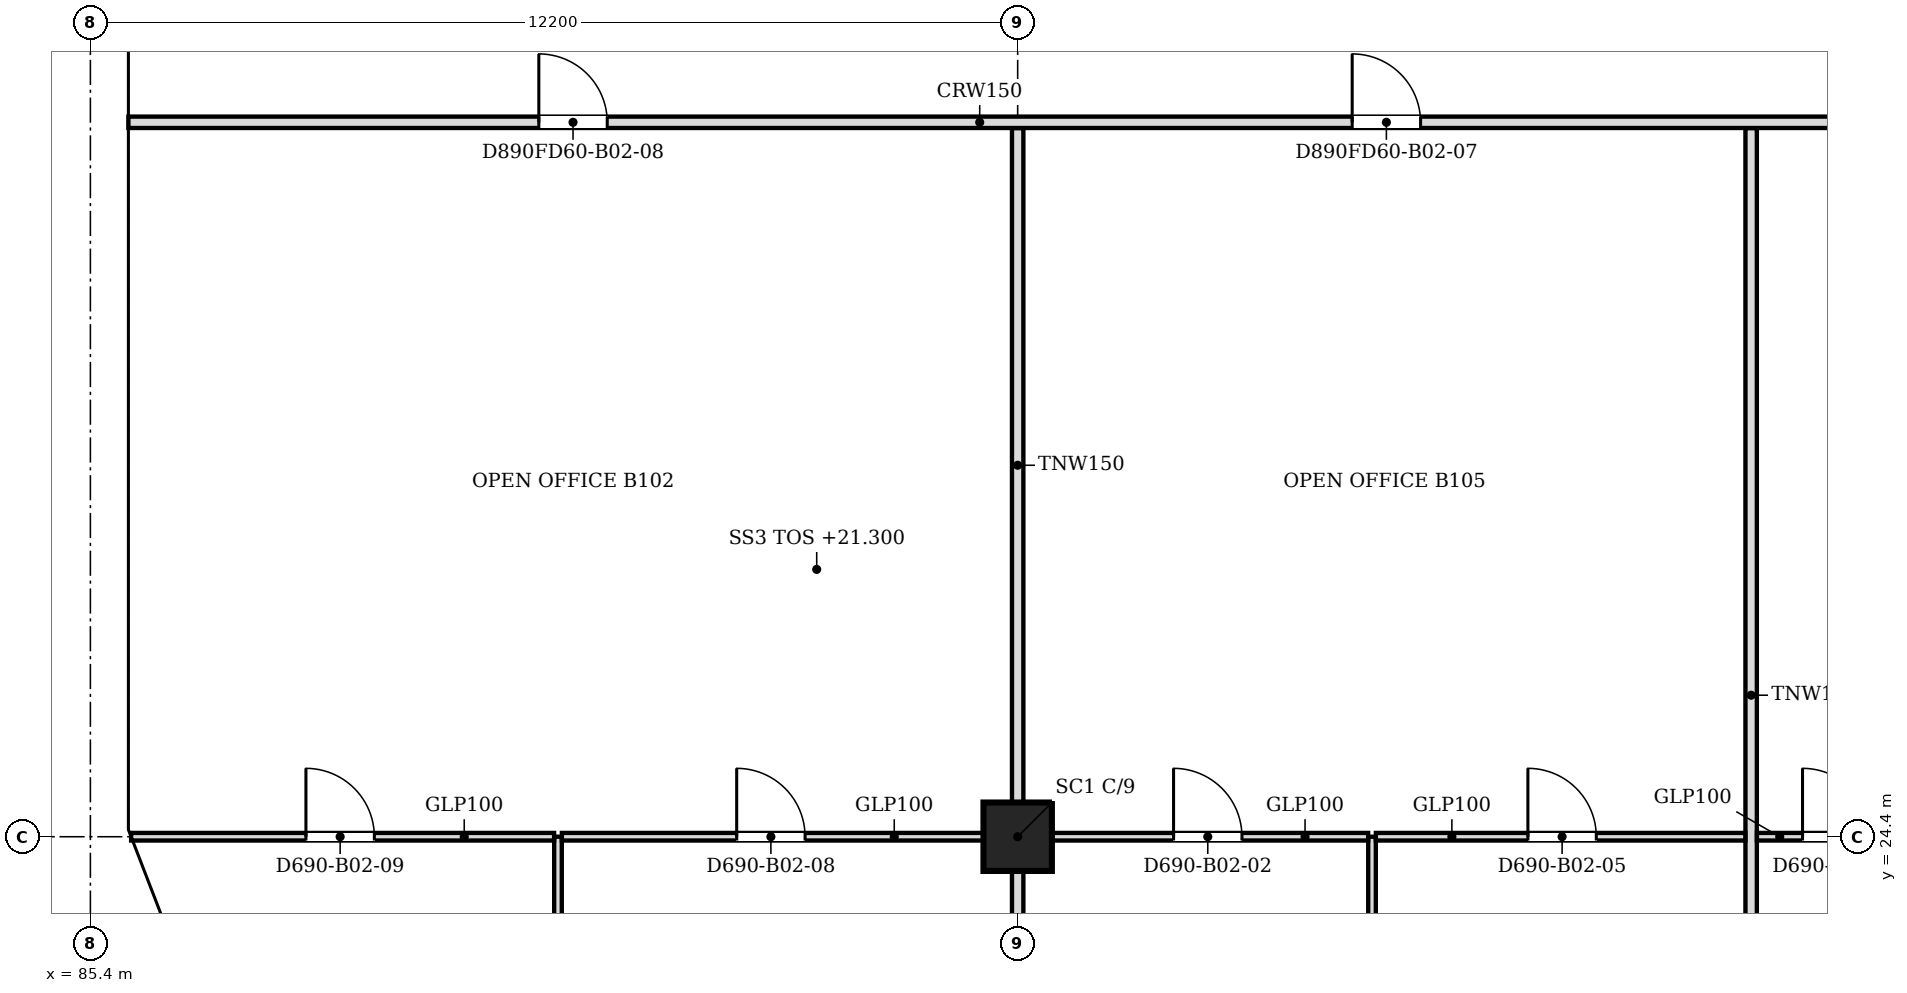
"""IFC4 building model, lengths in metres.
Left out: names, types, materials, properties, quantities, classifications, styles, units other than length and angle.
Written with IfcOpenShell. Run it as: python <this file> out.ifc"""

import sys

from ifc_helpers import new_model, si_unit, direction, frame, frame_2d, origin, origin_2d, place, context, subcontext, project, spatial, polyline, rectangle, outline, extrude, faceted_brep, source, transform, mapped, element, fill, save


model = new_model("IFC4")
c1 = context("Model", 3, precision=1e-05, world=origin(), true_north=direction((0.0, 1.0)))
c2 = subcontext(c1, "Body", "Model", "MODEL_VIEW")
j1 = project(units=[si_unit("LENGTHUNIT", "METRE"), si_unit("PLANEANGLEUNIT", "RADIAN")], contexts=[c1])
p1 = place(None, origin())
s1 = spatial("IfcSite", under=j1, at=p1, CompositionType="ELEMENT")
p2 = place(p1, origin())
s2 = spatial("IfcBuilding", under=s1, at=p2, CompositionType="ELEMENT")
p3 = place(p2, frame((0.0, 0.0, 21.3)))
s3 = spatial("IfcBuildingStorey", under=s2, at=p3, CompositionType="ELEMENT", Elevation=21.3)
p4 = place(p3, frame((97.6, 24.4, 0.0), z_axis=(0.0, 0.0, 1.0), x_axis=(1.0, 0.0, 0.0)))
e1 = element("IfcColumn", 1, at=p4, inside=s3, PredefinedType="COLUMN", context=c2, shape_type="SweptSolid", body=[
    extrude(rectangle(XDim=0.9, YDim=0.9, at=origin_2d()), origin(), (0.0, 0.0, 1.0), 4.3),
])
m1 = source(origin(), c2, "Body", "Brep", [
    faceted_brep([(3.05, -0.25, 0.0), (6.1, -0.25, 4.5), (6.1, -0.25, 4.5), (3.05, -0.25, 9.0), (0.0, -0.25, 4.5), (0.0, 0.25, 4.5), (3.05, 0.25, 9.0), (6.1, 0.25, 4.5), (6.1, 0.25, 4.5), (3.05, 0.25, 0.0)], [[[0, 1, 2, 3, 4]], [[5, 6, 7, 8, 9]], [[9, 8, 1, 0]], [[7, 6, 3, 2]], [[6, 5, 4, 3]], [[5, 9, 0, 4]], [[1, 8, 7, 2]]]),
])
p5 = place(p3, frame((85.65, 39.65, -4.5), z_axis=(0.0, 0.0, 1.0), x_axis=(0.0, -1.0, 0.0)))
e2 = element("IfcWall", 2, at=p5, inside=s3, PredefinedType="SOLIDWALL", context=c2, shape_type="MappedRepresentation", body=[
    mapped(m1, transform((0.0, 0.0, 0.0), scale=1.0)),
])
m2 = source(origin(), c2, "Body", "SweptSolid", [
    extrude(outline(polyline([(3.05, 0.446), (5.798, 4.5), (3.05, 8.554), (0.302, 4.5), (3.05, 0.446)])), frame((0.0, 0.26, 0.0), z_axis=(0.0, -1.0, 0.0), x_axis=(1.0, 0.0, 0.0)), (0.0, 0.0, 1.0), 0.52),
])
p6 = place(p5, origin())
e3 = element("IfcOpeningElement", 3, at=p6, cuts=e2, PredefinedType="OPENING", context=c2, shape_type="MappedRepresentation", body=[
    mapped(m2, transform((0.0, 0.0, 0.0), scale=1.0)),
])
m3 = source(origin(), c2, "Body", "SweptSolid", [
    extrude(outline(polyline([(3.05, 0.0), (4.85, 2.656), (4.85, 6.344), (3.05, 9.0), (0.0, 4.5), (3.05, 0.0)])), frame((0.0, 0.25, 0.0), z_axis=(0.0, -1.0, 0.0), x_axis=(1.0, 0.0, 0.0)), (0.0, 0.0, 1.0), 0.5),
])
p7 = place(p3, frame((85.65, 33.55, -4.5), z_axis=(0.0, 0.0, 1.0), x_axis=(0.0, -1.0, 0.0)))
e4 = element("IfcWall", 4, at=p7, inside=s3, PredefinedType="SOLIDWALL", context=c2, shape_type="MappedRepresentation", body=[
    mapped(m3, transform((0.0, 0.0, 0.0), scale=1.0)),
])
m4 = source(origin(), c2, "Body", "SweptSolid", [
    extrude(outline(polyline([(3.05, 0.446), (4.85, 3.101), (4.85, 5.899), (3.05, 8.554), (0.302, 4.5), (3.05, 0.446)])), frame((0.0, 0.26, 0.0), z_axis=(0.0, -1.0, 0.0), x_axis=(1.0, 0.0, 0.0)), (0.0, 0.0, 1.0), 0.52),
])
p8 = place(p7, origin())
e5 = element("IfcOpeningElement", 5, at=p8, cuts=e4, PredefinedType="OPENING", context=c2, shape_type="MappedRepresentation", body=[
    mapped(m4, transform((0.0, 0.0, 0.0), scale=1.0)),
])
m5 = source(origin(), c2, "Body", "Brep", [
    faceted_brep([(1.753, -0.25, 0.0), (1.8, -0.25, 0.071), (1.8, -0.25, 8.929), (1.753, -0.25, 9.0), (0.0, -0.25, 6.373), (0.0, -0.25, 2.627), (0.0, 0.25, 2.627), (0.0, 0.25, 6.373), (1.707, 0.25, 8.93), (1.707, 0.25, 0.07), (1.753, 0.0, 0.0), (1.753, 0.0, 9.0)], [[[0, 1, 2, 3, 4, 5]], [[6, 7, 8, 9]], [[1, 0, 10]], [[11, 3, 2]], [[8, 7, 4, 3, 11]], [[7, 6, 5, 4]], [[6, 9, 10, 0, 5]], [[1, 10, 9, 8, 11, 2]]]),
])
p9 = place(p3, frame((85.65, 26.2, -4.5), z_axis=(0.0, 0.0, 1.0), x_axis=(0.0, -1.0, 0.0)))
e6 = element("IfcWall", 6, at=p9, inside=s3, PredefinedType="SOLIDWALL", context=c2, shape_type="MappedRepresentation", body=[
    mapped(m5, transform((0.0, 0.0, 0.0), scale=1.0)),
])
m6 = source(origin(), c2, "Body", "SweptSolid", [
    extrude(outline(polyline([(1.553, 8.25), (0.0, 5.922), (0.0, 3.077), (1.553, 0.75), (1.553, 8.25)])), frame((0.0, 0.26, 0.0), z_axis=(0.0, -1.0, 0.0), x_axis=(1.0, 0.0, 0.0)), (0.0, 0.0, 1.0), 0.52),
])
p10 = place(p9, origin())
e7 = element("IfcOpeningElement", 7, at=p10, cuts=e6, PredefinedType="OPENING", context=c2, shape_type="MappedRepresentation", body=[
    mapped(m6, transform((0.0, 0.0, 0.0), scale=1.0)),
])
m7 = source(origin(), c2, "Body", "Brep", [
    faceted_brep([(0.047, -0.25, 0.0), (2.997, -0.25, 4.5), (0.047, -0.25, 9.0), (0.0, -0.25, 8.93), (0.0, -0.25, 0.07), (0.093, 0.25, 8.929), (2.944, 0.25, 4.581), (2.944, 0.25, 4.419), (0.093, 0.25, 0.071), (2.997, 0.0, 4.5), (0.047, 0.0, 0.0), (0.047, 0.0, 9.0)], [[[0, 1, 2, 3, 4]], [[5, 6, 7, 8]], [[8, 7, 9, 1, 0, 10]], [[6, 5, 11, 2, 1, 9]], [[3, 2, 11]], [[10, 0, 4]], [[8, 10, 4, 3, 11, 5]], [[9, 7, 6]]]),
])
p11 = place(p3, frame((85.633, 24.49, -4.5), z_axis=(0.0, 0.0, 1.0), x_axis=(0.359901446078, -0.932990326376, 0.0)))
e8 = element("IfcWall", 8, at=p11, inside=s3, PredefinedType="SOLIDWALL", context=c2, shape_type="MappedRepresentation", body=[
    mapped(m7, transform((0.0, 0.0, 0.0), scale=1.0)),
])
m8 = source(origin(), c2, "Body", "SweptSolid", [
    extrude(outline(polyline([(0.247, 0.761), (2.698, 4.5), (0.247, 8.239), (0.247, 0.761)])), frame((0.0, 0.26, 0.0), z_axis=(0.0, -1.0, 0.0), x_axis=(1.0, 0.0, 0.0)), (0.0, 0.0, 1.0), 0.52),
])
p12 = place(p11, origin())
e9 = element("IfcOpeningElement", 9, at=p12, cuts=e8, PredefinedType="OPENING", context=c2, shape_type="MappedRepresentation", body=[
    mapped(m8, transform((0.0, 0.0, 0.0), scale=1.0)),
])
m9 = source(origin(), c2, "Body", "SweptSolid", [
    extrude(outline(polyline([(3.05, 0.0), (6.1, 4.5), (0.0, 4.5), (3.05, 0.0)])), frame((0.0, 0.25, 0.0), z_axis=(0.0, -1.0, 0.0), x_axis=(1.0, 0.0, 0.0)), (0.0, 0.0, 1.0), 0.5),
])
p13 = place(p3, frame((85.65, 36.6, 0.0), z_axis=(0.0, 0.0, 1.0), x_axis=(0.0, -1.0, 0.0)))
e10 = element("IfcWall", 10, at=p13, inside=s3, PredefinedType="SOLIDWALL", context=c2, shape_type="MappedRepresentation", body=[
    mapped(m9, transform((0.0, 0.0, 0.0), scale=1.0)),
])
m10 = source(origin(), c2, "Body", "SweptSolid", [
    extrude(outline(polyline([(3.05, 0.446), (5.629, 4.25), (0.471, 4.25), (3.05, 0.446)])), frame((0.0, 0.26, 0.0), z_axis=(0.0, -1.0, 0.0), x_axis=(1.0, 0.0, 0.0)), (0.0, 0.0, 1.0), 0.52),
])
p14 = place(p13, origin())
e11 = element("IfcOpeningElement", 11, at=p14, cuts=e10, PredefinedType="OPENING", context=c2, shape_type="MappedRepresentation", body=[
    mapped(m10, transform((0.0, 0.0, 0.0), scale=1.0)),
])
m11 = source(origin(), c2, "Body", "Brep", [
    faceted_brep([(3.05, -0.25, 0.0), (6.053, -0.25, 4.5), (0.0, -0.25, 4.5), (0.0, 0.25, 4.5), (6.007, 0.25, 4.5), (6.007, 0.25, 4.43), (3.05, 0.25, 0.0), (6.053, 0.0, 4.5)], [[[0, 1, 2]], [[3, 4, 5, 6]], [[6, 5, 7, 1, 0]], [[4, 3, 2, 1, 7]], [[3, 6, 0, 2]], [[5, 4, 7]]]),
])
p15 = place(p3, frame((85.65, 30.5, 0.0), z_axis=(0.0, 0.0, 1.0), x_axis=(0.0, -1.0, 0.0)))
e12 = element("IfcWall", 12, at=p15, inside=s3, PredefinedType="SOLIDWALL", context=c2, shape_type="MappedRepresentation", body=[
    mapped(m11, transform((0.0, 0.0, 0.0), scale=1.0)),
])
m12 = source(origin(), c2, "Body", "SweptSolid", [
    extrude(outline(polyline([(3.048, 0.448), (5.586, 4.25), (0.471, 4.25), (3.048, 0.448)])), frame((0.0, 0.26, 0.0), z_axis=(0.0, -1.0, 0.0), x_axis=(1.0, 0.0, 0.0)), (0.0, 0.0, 1.0), 0.52),
])
p16 = place(p15, origin())
e13 = element("IfcOpeningElement", 13, at=p16, cuts=e12, PredefinedType="OPENING", context=c2, shape_type="MappedRepresentation", body=[
    mapped(m12, transform((0.0, 0.0, 0.0), scale=1.0)),
])
m13 = source(origin(), c2, "Body", "Brep", [
    faceted_brep([(2.95, -0.25, 0.0), (3.003, -0.25, 0.081), (3.003, -0.25, 4.5), (0.0, -0.25, 4.5), (0.047, 0.25, 4.5), (2.898, 0.25, 4.5), (2.898, 0.25, 0.081), (0.047, 0.25, 4.429), (2.95, 0.0, 0.0), (0.0, 0.0, 4.5)], [[[0, 1, 2, 3]], [[4, 5, 6, 7]], [[1, 0, 8]], [[5, 4, 9, 3, 2]], [[7, 6, 8, 0, 3, 9]], [[7, 9, 4]], [[1, 8, 6, 5, 2]]]),
])
p17 = place(p3, frame((85.65, 24.447, 0.0), z_axis=(0.0, 0.0, 1.0), x_axis=(0.35992665181, -0.932980602862, 0.0)))
e14 = element("IfcWall", 14, at=p17, inside=s3, PredefinedType="SOLIDWALL", context=c2, shape_type="MappedRepresentation", body=[
    mapped(m13, transform((0.0, 0.0, 0.0), scale=1.0)),
])
m14 = source(origin(), c2, "Body", "SweptSolid", [
    extrude(outline(polyline([(2.75, 4.25), (0.463, 4.25), (2.75, 0.761), (2.75, 4.25)])), frame((0.0, 0.26, 0.0), z_axis=(0.0, -1.0, 0.0), x_axis=(1.0, 0.0, 0.0)), (0.0, 0.0, 1.0), 0.52),
])
p18 = place(p17, origin())
e15 = element("IfcOpeningElement", 15, at=p18, cuts=e14, PredefinedType="OPENING", context=c2, shape_type="MappedRepresentation", body=[
    mapped(m14, transform((0.0, 0.0, 0.0), scale=1.0)),
])
p19 = place(p3, frame((97.6, 18.8, 0.0), z_axis=(0.0, 0.0, 1.0), x_axis=(0.0, 1.0, 0.0)))
e16 = element("IfcWall", 16, at=p19, inside=s3, PredefinedType="PARTITIONING", context=c2, shape_type="SweptSolid", body=[
    extrude(rectangle(XDim=5.149, YDim=0.15, at=frame_2d((2.574, 0.0))), origin(), (0.0, 0.0, 1.0), 3.767),
])
p20 = place(p3, frame((102.262, 18.8, 0.0), z_axis=(0.0, 0.0, 1.0), x_axis=(0.0, 1.0, 0.0)))
e17 = element("IfcWall", 17, at=p20, inside=s3, PredefinedType="PARTITIONING", context=c2, shape_type="SweptSolid", body=[
    extrude(rectangle(XDim=5.6, YDim=0.1, at=frame_2d((2.8, 0.0))), origin(), (0.0, 0.0, 1.0), 3.767),
])
p21 = place(p3, frame((107.25, 18.8, 0.0), z_axis=(0.0, 0.0, 1.0), x_axis=(0.0, 1.0, 0.0)))
e18 = element("IfcWall", 18, at=p21, inside=s3, PredefinedType="PARTITIONING", context=c2, shape_type="SweptSolid", body=[
    extrude(rectangle(XDim=14.924, YDim=0.15, at=frame_2d((7.462, 0.0))), origin(), (0.0, 0.0, 1.0), 3.767),
])
p22 = place(p3, frame((91.552, 18.816, 0.0), z_axis=(0.0, 0.0, 1.0), x_axis=(0.0, 1.0, 0.0)))
e19 = element("IfcWall", 19, at=p22, inside=s3, PredefinedType="PARTITIONING", context=c2, shape_type="SweptSolid", body=[
    extrude(rectangle(XDim=5.584, YDim=0.1, at=frame_2d((2.792, 0.0))), origin(), (0.0, 0.0, 1.0), 3.767),
])
p23 = place(p3, frame((91.501, 24.4, 0.0), z_axis=(0.0, 0.0, 1.0), x_axis=(-1.0, 0.0, 0.0)))
e20 = element("IfcWall", 20, at=p23, inside=s3, PredefinedType="PARTITIONING", context=c2, shape_type="SweptSolid", body=[
    extrude(rectangle(XDim=5.565, YDim=0.1, at=frame_2d((2.783, 0.0))), origin(), (0.0, 0.0, 1.0), 3.767),
])
m15 = source(origin(), c2, "Body", "SweptSolid", [
    extrude(rectangle(XDim=0.9, YDim=2.1, at=frame_2d((0.45, 1.05))), frame((0.0, 0.06, 0.0), z_axis=(0.0, -1.0, 0.0), x_axis=(1.0, 0.0, 0.0)), (0.0, 0.0, 1.0), 0.12),
])
p24 = place(p23, frame((2.365, 0.0, 0.0)))
e21 = element("IfcOpeningElement", 21, at=p24, cuts=e20, PredefinedType="OPENING", context=c2, shape_type="MappedRepresentation", body=[
    mapped(m15, transform((0.0, 0.0, 0.0), scale=1.0)),
])
p25 = place(p3, frame((97.149, 24.4, 0.0), z_axis=(0.0, 0.0, 1.0), x_axis=(-1.0, 0.0, 0.0)))
e22 = element("IfcWall", 22, at=p25, inside=s3, PredefinedType="PARTITIONING", context=c2, shape_type="SweptSolid", body=[
    extrude(rectangle(XDim=5.546, YDim=0.1, at=frame_2d((2.773, 0.0))), origin(), (0.0, 0.0, 1.0), 3.767),
])
p26 = place(p25, frame((2.346, 0.0, 0.0)))
e23 = element("IfcOpeningElement", 23, at=p26, cuts=e22, PredefinedType="OPENING", context=c2, shape_type="MappedRepresentation", body=[
    mapped(m15, transform((0.0, 0.0, 0.0), scale=1.0)),
])
p27 = place(p3, frame((102.211, 24.4, 0.0), z_axis=(0.0, 0.0, 1.0), x_axis=(-1.0, 0.0, 0.0)))
e24 = element("IfcWall", 24, at=p27, inside=s3, PredefinedType="PARTITIONING", context=c2, shape_type="SweptSolid", body=[
    extrude(rectangle(XDim=4.16, YDim=0.1, at=frame_2d((2.08, 0.0))), origin(), (0.0, 0.0, 1.0), 3.767),
])
p28 = place(p27, frame((1.66, 0.0, 0.0)))
e25 = element("IfcOpeningElement", 25, at=p28, cuts=e24, PredefinedType="OPENING", context=c2, shape_type="MappedRepresentation", body=[
    mapped(m15, transform((0.0, 0.0, 0.0), scale=1.0)),
])
p29 = place(p3, frame((107.174, 24.4, 0.0), z_axis=(0.0, 0.0, 1.0), x_axis=(-1.0, 0.0, 0.0)))
e26 = element("IfcWall", 26, at=p29, inside=s3, PredefinedType="PARTITIONING", context=c2, shape_type="SweptSolid", body=[
    extrude(rectangle(XDim=4.861, YDim=0.1, at=frame_2d((2.431, 0.0))), origin(), (0.0, 0.0, 1.0), 3.767),
])
p30 = place(p29, frame((1.961, 0.0, 0.0)))
e27 = element("IfcOpeningElement", 27, at=p30, cuts=e26, PredefinedType="OPENING", context=c2, shape_type="MappedRepresentation", body=[
    mapped(m15, transform((0.0, 0.0, 0.0), scale=1.0)),
])
p31 = place(p3, frame((109.349, 24.4, 0.0), z_axis=(0.0, 0.0, 1.0), x_axis=(-1.0, 0.0, 0.0)))
e28 = element("IfcWall", 28, at=p31, inside=s3, PredefinedType="PARTITIONING", context=c2, shape_type="SweptSolid", body=[
    extrude(rectangle(XDim=2.023, YDim=0.1, at=frame_2d((1.012, 0.0))), origin(), (0.0, 0.0, 1.0), 3.767),
])
p32 = place(p31, frame((0.523, 0.0, 0.0)))
e29 = element("IfcOpeningElement", 29, at=p32, cuts=e28, PredefinedType="OPENING", context=c2, shape_type="MappedRepresentation", body=[
    mapped(m15, transform((0.0, 0.0, 0.0), scale=1.0)),
])
p33 = place(p3, frame((97.6, 24.851, 0.0), z_axis=(0.0, 0.0, 1.0), x_axis=(0.0, 1.0, 0.0)))
e30 = element("IfcWall", 30, at=p33, inside=s3, PredefinedType="PARTITIONING", context=c2, shape_type="SweptSolid", body=[
    extrude(rectangle(XDim=8.873, YDim=0.15, at=frame_2d((4.437, 0.0))), origin(), (0.0, 0.0, 1.0), 3.767),
])
p34 = place(p3, frame((133.7, 33.8, 0.0), z_axis=(0.0, 0.0, 1.0), x_axis=(-1.0, 0.0, 0.0)))
e31 = element("IfcWall", 31, at=p34, inside=s3, PredefinedType="PARTITIONING", context=c2, shape_type="SweptSolid", body=[
    extrude(rectangle(XDim=47.8, YDim=0.15, at=frame_2d((23.9, 0.0))), origin(), (0.0, 0.0, 1.0), 3.767),
])
m16 = source(origin(), c2, "Body", "SweptSolid", [
    extrude(rectangle(XDim=0.9, YDim=2.1, at=frame_2d((0.45, 1.05))), frame((0.0, 0.085, 0.0), z_axis=(0.0, -1.0, 0.0), x_axis=(1.0, 0.0, 0.0)), (0.0, 0.0, 1.0), 0.17),
])
p35 = place(p34, frame((2.099, 0.0, 0.0)))
e32 = element("IfcOpeningElement", 32, at=p35, cuts=e31, PredefinedType="OPENING", context=c2, shape_type="MappedRepresentation", body=[
    mapped(m16, transform((0.0, 0.0, 0.0), scale=1.0)),
])
p36 = place(p34, frame((14.099, 0.0, 0.0)))
e33 = element("IfcOpeningElement", 33, at=p36, cuts=e31, PredefinedType="OPENING", context=c2, shape_type="MappedRepresentation", body=[
    mapped(m16, transform((0.0, 0.0, 0.0), scale=1.0)),
])
p37 = place(p34, frame((8.0, 0.0, 0.0)))
e34 = element("IfcOpeningElement", 34, at=p37, cuts=e31, PredefinedType="OPENING", context=c2, shape_type="MappedRepresentation", body=[
    mapped(m16, transform((0.0, 0.0, 0.0), scale=1.0)),
])
p38 = place(p34, frame((21.449, 0.0, 0.0)))
e35 = element("IfcOpeningElement", 35, at=p38, cuts=e31, PredefinedType="OPENING", context=c2, shape_type="MappedRepresentation", body=[
    mapped(m16, transform((0.0, 0.0, 0.0), scale=1.0)),
])
p39 = place(p34, frame((30.799, 0.0, 0.0)))
e36 = element("IfcOpeningElement", 36, at=p39, cuts=e31, PredefinedType="OPENING", context=c2, shape_type="MappedRepresentation", body=[
    mapped(m16, transform((0.0, 0.0, 0.0), scale=1.0)),
])
p40 = place(p34, frame((41.5, 0.0, 0.0)))
e37 = element("IfcOpeningElement", 37, at=p40, cuts=e31, PredefinedType="OPENING", context=c2, shape_type="MappedRepresentation", body=[
    mapped(m16, transform((0.0, 0.0, 0.0), scale=1.0)),
])
m17 = source(origin(), c2, "Body", "SweptSolid", [
    extrude(rectangle(XDim=0.9, YDim=2.1, at=frame_2d((0.45, 1.05))), frame((0.0, 0.025, 0.0), z_axis=(0.0, -1.0, 0.0), x_axis=(1.0, 0.0, 0.0)), (0.0, 0.0, 1.0), 0.05),
])
p41 = place(p32, origin())
e38 = element("IfcDoor", 38, at=p41, inside=s3, OperationType="SINGLE_SWING_RIGHT", PredefinedType="DOOR", context=c2, shape_type="MappedRepresentation", body=[
    mapped(m17, transform((0.0, 0.0, 0.0), scale=1.0)),
])
fill(e29, e38)
p42 = place(p28, origin())
e39 = element("IfcDoor", 39, at=p42, inside=s3, OperationType="SINGLE_SWING_RIGHT", PredefinedType="DOOR", context=c2, shape_type="MappedRepresentation", body=[
    mapped(m17, transform((0.0, 0.0, 0.0), scale=1.0)),
])
fill(e25, e39)
p43 = place(p30, origin())
e40 = element("IfcDoor", 40, at=p43, inside=s3, OperationType="SINGLE_SWING_RIGHT", PredefinedType="DOOR", context=c2, shape_type="MappedRepresentation", body=[
    mapped(m17, transform((0.0, 0.0, 0.0), scale=1.0)),
])
fill(e27, e40)
p44 = place(p26, origin())
e41 = element("IfcDoor", 41, at=p44, inside=s3, OperationType="SINGLE_SWING_RIGHT", PredefinedType="DOOR", context=c2, shape_type="MappedRepresentation", body=[
    mapped(m17, transform((0.0, 0.0, 0.0), scale=1.0)),
])
fill(e23, e41)
p45 = place(p24, origin())
e42 = element("IfcDoor", 42, at=p45, inside=s3, OperationType="SINGLE_SWING_RIGHT", PredefinedType="DOOR", context=c2, shape_type="MappedRepresentation", body=[
    mapped(m17, transform((0.0, 0.0, 0.0), scale=1.0)),
])
fill(e21, e42)
p46 = place(p39, origin())
e43 = element("IfcDoor", 43, at=p46, inside=s3, OperationType="SINGLE_SWING_RIGHT", PredefinedType="DOOR", context=c2, shape_type="MappedRepresentation", body=[
    mapped(m17, transform((0.0, 0.0, 0.0), scale=1.0)),
])
fill(e36, e43)
p47 = place(p40, origin())
e44 = element("IfcDoor", 44, at=p47, inside=s3, OperationType="SINGLE_SWING_RIGHT", PredefinedType="DOOR", context=c2, shape_type="MappedRepresentation", body=[
    mapped(m17, transform((0.0, 0.0, 0.0), scale=1.0)),
])
fill(e37, e44)
save(model, sys.argv[1])
